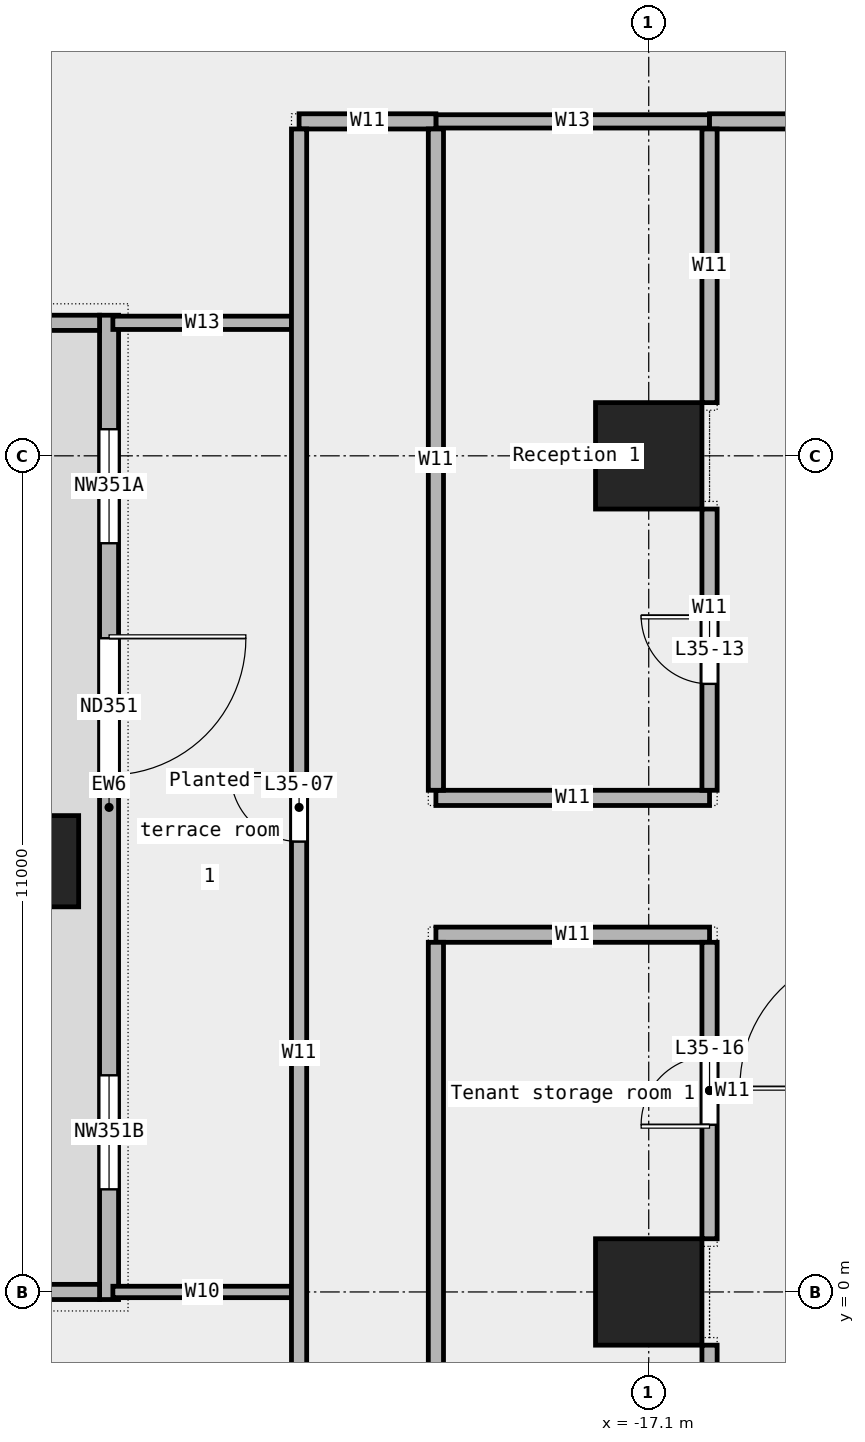
"""IFC4 building model, lengths in metres.
Left out: names, types, materials, properties, quantities, classifications, styles, units other than length and angle.
Written with IfcOpenShell. Run it as: python <this file> out.ifc"""

import sys

from ifc_helpers import new_model, si_unit, direction, frame, frame_2d, origin, origin_2d, place, context, subcontext, project, spatial, rectangle, extrude, element, fill, save


model = new_model("IFC4")
c1 = context("Model", 3, precision=1e-05, world=origin(), true_north=direction((0.0, 1.0)))
c2 = subcontext(c1, "Body", "Model", "MODEL_VIEW")
j1 = project(units=[si_unit("LENGTHUNIT", "METRE"), si_unit("PLANEANGLEUNIT", "RADIAN")], contexts=[c1])
p1 = place(None, origin())
s1 = spatial("IfcSite", under=j1, at=p1, CompositionType="ELEMENT")
p2 = place(p1, origin())
s2 = spatial("IfcBuilding", under=s1, at=p2, CompositionType="ELEMENT")
p3 = place(p2, frame((0.0, 0.0, 173.0)))
s3 = spatial("IfcBuildingStorey", under=s2, at=p3, CompositionType="ELEMENT", Elevation=173.0)
p4 = place(p3, frame((-25.2, 5.667, 0.0), z_axis=(0.0, 0.0, 1.0), x_axis=(1.0, 0.0, 0.0)))
e1 = element("IfcColumn", 1, at=p4, inside=s3, PredefinedType="COLUMN", context=c2, shape_type="SweptSolid", body=[
    extrude(rectangle(XDim=1.2, YDim=1.2, at=origin_2d()), origin(), (0.0, 0.0, 1.0), 3.6),
])
for number, where, z_axis, x_axis in (
    (2, (-17.1, 0.0, 0.0), (0.0, 0.0, 1.0), (1.0, 0.0, 0.0)),
    (3, (-17.1, 11.0, 0.0), (0.0, 0.0, 1.0), (1.0, 0.0, 0.0)),
):
    element("IfcColumn", number, at=place(p3, frame(where, z_axis=z_axis, x_axis=x_axis)), inside=s3, PredefinedType="COLUMN", context=c2, shape_type="SweptSolid", body=[
        extrude(rectangle(XDim=1.4, YDim=1.4, at=origin_2d()), origin(), (0.0, 0.0, 1.0), 3.6),
    ])
p5 = place(p3, frame((-24.2, 12.85, 0.0), z_axis=(0.0, 0.0, 1.0), x_axis=(0.0, -1.0, 0.0)))
e4 = element("IfcWall", 4, at=p5, inside=s3, PredefinedType="STANDARD", context=c2, shape_type="SweptSolid", body=[
    extrude(rectangle(XDim=12.95, YDim=0.25, at=frame_2d((6.475, 0.0))), origin(), (0.0, 0.0, 1.0), 3.6),
])
p6 = place(p5, frame((1.5, 0.0, 0.45)))
e5 = element("IfcOpeningElement", 5, at=p6, cuts=e4, PredefinedType="OPENING", context=c2, shape_type="SweptSolid", body=[
    extrude(rectangle(XDim=1.5, YDim=2.4, at=frame_2d((0.75, 1.2))), frame((0.0, 0.137, 0.0), z_axis=(0.0, -1.0, 0.0), x_axis=(1.0, 0.0, 0.0)), (0.0, 0.0, 1.0), 0.274),
])
p7 = place(p5, frame((4.25, 0.0, 0.0)))
e6 = element("IfcOpeningElement", 6, at=p7, cuts=e4, PredefinedType="OPENING", context=c2, shape_type="SweptSolid", body=[
    extrude(rectangle(XDim=1.8, YDim=2.4, at=frame_2d((0.9, 1.2))), frame((0.0, 0.137, 0.0), z_axis=(0.0, -1.0, 0.0), x_axis=(1.0, 0.0, 0.0)), (0.0, 0.0, 1.0), 0.274),
])
p8 = place(p5, frame((10.0, 0.0, 0.45)))
e7 = element("IfcOpeningElement", 7, at=p8, cuts=e4, PredefinedType="OPENING", context=c2, shape_type="SweptSolid", body=[
    extrude(rectangle(XDim=1.5, YDim=2.4, at=frame_2d((0.75, 1.2))), frame((0.0, 0.137, 0.0), z_axis=(0.0, -1.0, 0.0), x_axis=(1.0, 0.0, 0.0)), (0.0, 0.0, 1.0), 0.274),
])
for number, where, z_axis, x_axis in (
    (8, (-26.2, 12.75, 0.0), (0.0, 0.0, 1.0), (1.0, 0.0, 0.0)),
    (9, (-26.2, 0.0, 0.0), (0.0, 0.0, 1.0), (1.0, 0.0, 0.0)),
):
    element("IfcWall", number, at=place(p3, frame(where, z_axis=z_axis, x_axis=x_axis)), inside=s3, PredefinedType="STANDARD", context=c2, shape_type="SweptSolid", body=[
        extrude(rectangle(XDim=1.875, YDim=0.2, at=frame_2d((0.938, 0.0))), origin(), (0.0, 0.0, 1.0), 3.6),
    ])
p9 = place(p3, frame((-24.15, 0.0, 0.0), z_axis=(0.0, 0.0, 1.0), x_axis=(1.0, 0.0, 0.0)))
e10 = element("IfcWall", 10, at=p9, inside=s3, PredefinedType="PARTITIONING", context=c2, shape_type="SweptSolid", body=[
    extrude(rectangle(XDim=2.35, YDim=0.15, at=frame_2d((1.175, 0.0))), origin(), (0.0, 0.0, 1.0), 3.6),
])
for number, where, z_axis, x_axis in (
    (11, (-19.9, 4.7, 0.0), (0.0, 0.0, 1.0), (1.0, 0.0, 0.0)),
    (12, (-19.9, 6.5, 0.0), (0.0, 0.0, 1.0), (1.0, 0.0, 0.0)),
):
    element("IfcWall", number, at=place(p3, frame(where, z_axis=z_axis, x_axis=x_axis)), inside=s3, PredefinedType="PARTITIONING", context=c2, shape_type="SweptSolid", body=[
        extrude(rectangle(XDim=3.6, YDim=0.2, at=frame_2d((1.8, 0.0))), origin(), (0.0, 0.0, 1.0), 3.6),
    ])
p10 = place(p3, frame((-24.15, 12.75, 0.0), z_axis=(0.0, 0.0, 1.0), x_axis=(1.0, 0.0, 0.0)))
e13 = element("IfcWall", 13, at=p10, inside=s3, PredefinedType="PARTITIONING", context=c2, shape_type="SweptSolid", body=[
    extrude(rectangle(XDim=2.35, YDim=0.175, at=frame_2d((1.175, 0.0))), origin(), (0.0, 0.0, 1.0), 3.6),
])
p11 = place(p3, frame((-19.9, 15.4, 0.0), z_axis=(0.0, 0.0, 1.0), x_axis=(1.0, 0.0, 0.0)))
e14 = element("IfcWall", 14, at=p11, inside=s3, PredefinedType="PARTITIONING", context=c2, shape_type="SweptSolid", body=[
    extrude(rectangle(XDim=3.6, YDim=0.175, at=frame_2d((1.8, 0.0))), origin(), (0.0, 0.0, 1.0), 3.6),
])
p12 = place(p3, frame((-21.7, 15.4, 0.0), z_axis=(0.0, 0.0, 1.0), x_axis=(1.0, 0.0, 0.0)))
e15 = element("IfcWall", 15, at=p12, inside=s3, PredefinedType="PARTITIONING", context=c2, shape_type="SweptSolid", body=[
    extrude(rectangle(XDim=1.8, YDim=0.2, at=frame_2d((0.9, 0.0))), origin(), (0.0, 0.0, 1.0), 3.6),
])
p13 = place(p3, frame((-16.3, 15.4, 0.0), z_axis=(0.0, 0.0, 1.0), x_axis=(1.0, 0.0, 0.0)))
e16 = element("IfcWall", 16, at=p13, inside=s3, PredefinedType="PARTITIONING", context=c2, shape_type="SweptSolid", body=[
    extrude(rectangle(XDim=32.6, YDim=0.2, at=frame_2d((16.3, 0.0))), origin(), (0.0, 0.0, 1.0), 3.6),
])
p14 = place(p13, frame((24.415, 0.0, 0.0)))
e17 = element("IfcOpeningElement", 17, at=p14, cuts=e16, PredefinedType="OPENING", context=c2, shape_type="SweptSolid", body=[
    extrude(rectangle(XDim=1.8, YDim=2.1, at=frame_2d((0.9, 1.05))), frame((0.0, 0.112, 0.0), z_axis=(0.0, -1.0, 0.0), x_axis=(1.0, 0.0, 0.0)), (0.0, 0.0, 1.0), 0.224),
])
p15 = place(p13, frame((12.24, 0.0, 0.0)))
e18 = element("IfcOpeningElement", 18, at=p15, cuts=e16, PredefinedType="OPENING", context=c2, shape_type="SweptSolid", body=[
    extrude(rectangle(XDim=1.2, YDim=2.1, at=frame_2d((0.6, 1.05))), frame((0.0, 0.112, 0.0), z_axis=(0.0, -1.0, 0.0), x_axis=(1.0, 0.0, 0.0)), (0.0, 0.0, 1.0), 0.224),
])
p16 = place(p13, frame((3.075, 0.0, 0.0)))
e19 = element("IfcOpeningElement", 19, at=p16, cuts=e16, PredefinedType="OPENING", context=c2, shape_type="SweptSolid", body=[
    extrude(rectangle(XDim=1.5, YDim=2.1, at=frame_2d((0.75, 1.05))), frame((0.0, 0.112, 0.0), z_axis=(0.0, -1.0, 0.0), x_axis=(1.0, 0.0, 0.0)), (0.0, 0.0, 1.0), 0.224),
])
p17 = place(p3, frame((-21.7, -9.0, 0.0), z_axis=(0.0, 0.0, 1.0), x_axis=(0.0, 1.0, 0.0)))
e20 = element("IfcWall", 20, at=p17, inside=s3, PredefinedType="PARTITIONING", context=c2, shape_type="SweptSolid", body=[
    extrude(rectangle(XDim=24.3, YDim=0.2, at=frame_2d((12.15, 0.0))), origin(), (0.0, 0.0, 1.0), 3.6),
])
p18 = place(p17, frame((14.925, 0.0, 0.0)))
e21 = element("IfcOpeningElement", 21, at=p18, cuts=e20, PredefinedType="OPENING", context=c2, shape_type="SweptSolid", body=[
    extrude(rectangle(XDim=0.9, YDim=2.1, at=frame_2d((0.45, 1.05))), frame((0.0, 0.112, 0.0), z_axis=(0.0, -1.0, 0.0), x_axis=(1.0, 0.0, 0.0)), (0.0, 0.0, 1.0), 0.224),
])
p19 = place(p17, frame((2.562, 0.0, 0.0)))
e22 = element("IfcOpeningElement", 22, at=p19, cuts=e20, PredefinedType="OPENING", context=c2, shape_type="SweptSolid", body=[
    extrude(rectangle(XDim=0.9, YDim=2.1, at=frame_2d((0.45, 1.05))), frame((0.0, 0.112, 0.0), z_axis=(0.0, -1.0, 0.0), x_axis=(1.0, 0.0, 0.0)), (0.0, 0.0, 1.0), 0.224),
])
p20 = place(p3, frame((-19.9, -9.0, 0.0), z_axis=(0.0, 0.0, 1.0), x_axis=(0.0, 1.0, 0.0)))
e23 = element("IfcWall", 23, at=p20, inside=s3, PredefinedType="PARTITIONING", context=c2, shape_type="SweptSolid", body=[
    extrude(rectangle(XDim=13.6, YDim=0.2, at=frame_2d((6.8, 0.0))), origin(), (0.0, 0.0, 1.0), 3.6),
])
p21 = place(p3, frame((-19.9, 6.6, 0.0), z_axis=(0.0, 0.0, 1.0), x_axis=(0.0, 1.0, 0.0)))
e24 = element("IfcWall", 24, at=p21, inside=s3, PredefinedType="PARTITIONING", context=c2, shape_type="SweptSolid", body=[
    extrude(rectangle(XDim=8.7, YDim=0.2, at=frame_2d((4.35, 0.0))), origin(), (0.0, 0.0, 1.0), 3.6),
])
p22 = place(p3, frame((-16.3, -9.0, 0.0), z_axis=(0.0, 0.0, 1.0), x_axis=(0.0, 1.0, 0.0)))
e25 = element("IfcWall", 25, at=p22, inside=s3, PredefinedType="PARTITIONING", context=c2, shape_type="SweptSolid", body=[
    extrude(rectangle(XDim=8.3, YDim=0.2, at=frame_2d((4.15, 0.0))), origin(), (0.0, 0.0, 1.0), 3.6),
])
p23 = place(p22, frame((3.442, 0.0, 0.0)))
e26 = element("IfcOpeningElement", 26, at=p23, cuts=e25, PredefinedType="OPENING", context=c2, shape_type="SweptSolid", body=[
    extrude(rectangle(XDim=0.9, YDim=2.1, at=frame_2d((0.45, 1.05))), frame((0.0, 0.112, 0.0), z_axis=(0.0, -1.0, 0.0), x_axis=(1.0, 0.0, 0.0)), (0.0, 0.0, 1.0), 0.224),
])
p24 = place(p3, frame((-16.3, 0.7, 0.0), z_axis=(0.0, 0.0, 1.0), x_axis=(0.0, 1.0, 0.0)))
e27 = element("IfcWall", 27, at=p24, inside=s3, PredefinedType="PARTITIONING", context=c2, shape_type="SweptSolid", body=[
    extrude(rectangle(XDim=3.9, YDim=0.2, at=frame_2d((1.95, 0.0))), origin(), (0.0, 0.0, 1.0), 3.6),
])
p25 = place(p24, frame((1.5, 0.0, 0.0)))
e28 = element("IfcOpeningElement", 28, at=p25, cuts=e27, PredefinedType="OPENING", context=c2, shape_type="SweptSolid", body=[
    extrude(rectangle(XDim=0.9, YDim=2.1, at=frame_2d((0.45, 1.05))), frame((0.0, 0.112, 0.0), z_axis=(0.0, -1.0, 0.0), x_axis=(1.0, 0.0, 0.0)), (0.0, 0.0, 1.0), 0.224),
])
p26 = place(p3, frame((-16.3, 6.6, 0.0), z_axis=(0.0, 0.0, 1.0), x_axis=(0.0, 1.0, 0.0)))
e29 = element("IfcWall", 29, at=p26, inside=s3, PredefinedType="PARTITIONING", context=c2, shape_type="SweptSolid", body=[
    extrude(rectangle(XDim=3.7, YDim=0.2, at=frame_2d((1.85, 0.0))), origin(), (0.0, 0.0, 1.0), 3.6),
])
p27 = place(p26, frame((1.4, 0.0, 0.0)))
e30 = element("IfcOpeningElement", 30, at=p27, cuts=e29, PredefinedType="OPENING", context=c2, shape_type="SweptSolid", body=[
    extrude(rectangle(XDim=0.9, YDim=2.1, at=frame_2d((0.45, 1.05))), frame((0.0, 0.112, 0.0), z_axis=(0.0, -1.0, 0.0), x_axis=(1.0, 0.0, 0.0)), (0.0, 0.0, 1.0), 0.224),
])
p28 = place(p3, frame((-16.3, 11.7, 0.0), z_axis=(0.0, 0.0, 1.0), x_axis=(0.0, 1.0, 0.0)))
e31 = element("IfcWall", 31, at=p28, inside=s3, PredefinedType="PARTITIONING", context=c2, shape_type="SweptSolid", body=[
    extrude(rectangle(XDim=3.6, YDim=0.2, at=frame_2d((1.8, 0.0))), origin(), (0.0, 0.0, 1.0), 3.6),
])
p29 = place(p6, origin())
e32 = element("IfcWindow", 32, at=p29, inside=s3, PartitioningType="SINGLE_PANEL", PredefinedType="WINDOW", context=c2, shape_type="SweptSolid", body=[
    extrude(rectangle(XDim=1.5, YDim=2.4, at=frame_2d((0.75, 1.2))), frame((0.0, 0.03, 0.0), z_axis=(0.0, -1.0, 0.0), x_axis=(1.0, 0.0, 0.0)), (0.0, 0.0, 1.0), 0.06),
])
fill(e5, e32)
p30 = place(p7, origin())
e33 = element("IfcDoor", 33, at=p30, inside=s3, OperationType="DOUBLE_DOOR_SINGLE_SWING", PredefinedType="DOOR", context=c2, shape_type="SweptSolid", body=[
    extrude(rectangle(XDim=1.8, YDim=2.4, at=frame_2d((0.9, 1.2))), frame((0.0, 0.025, 0.0), z_axis=(0.0, -1.0, 0.0), x_axis=(1.0, 0.0, 0.0)), (0.0, 0.0, 1.0), 0.05),
])
fill(e6, e33)
p31 = place(p8, origin())
e34 = element("IfcWindow", 34, at=p31, inside=s3, PartitioningType="SINGLE_PANEL", PredefinedType="WINDOW", context=c2, shape_type="SweptSolid", body=[
    extrude(rectangle(XDim=1.5, YDim=2.4, at=frame_2d((0.75, 1.2))), frame((0.0, 0.03, 0.0), z_axis=(0.0, -1.0, 0.0), x_axis=(1.0, 0.0, 0.0)), (0.0, 0.0, 1.0), 0.06),
])
fill(e7, e34)
p32 = place(p18, origin())
e35 = element("IfcDoor", 35, at=p32, inside=s3, OperationType="SINGLE_SWING_RIGHT", PredefinedType="DOOR", context=c2, shape_type="SweptSolid", body=[
    extrude(rectangle(XDim=0.9, YDim=2.1, at=frame_2d((0.45, 1.05))), frame((0.0, 0.025, 0.0), z_axis=(0.0, -1.0, 0.0), x_axis=(1.0, 0.0, 0.0)), (0.0, 0.0, 1.0), 0.05),
])
fill(e21, e35)
p33 = place(p27, origin())
e36 = element("IfcDoor", 36, at=p33, inside=s3, OperationType="SINGLE_SWING_RIGHT", PredefinedType="DOOR", context=c2, shape_type="SweptSolid", body=[
    extrude(rectangle(XDim=0.9, YDim=2.1, at=frame_2d((0.45, 1.05))), frame((0.0, 0.025, 0.0), z_axis=(0.0, -1.0, 0.0), x_axis=(1.0, 0.0, 0.0)), (0.0, 0.0, 1.0), 0.05),
])
fill(e30, e36)
p34 = place(p25, origin())
e37 = element("IfcDoor", 37, at=p34, inside=s3, OperationType="SINGLE_SWING_LEFT", PredefinedType="DOOR", context=c2, shape_type="SweptSolid", body=[
    extrude(rectangle(XDim=0.9, YDim=2.1, at=frame_2d((0.45, 1.05))), frame((0.0, 0.025, 0.0), z_axis=(0.0, -1.0, 0.0), x_axis=(1.0, 0.0, 0.0)), (0.0, 0.0, 1.0), 0.05),
])
fill(e28, e37)
save(model, sys.argv[1])
